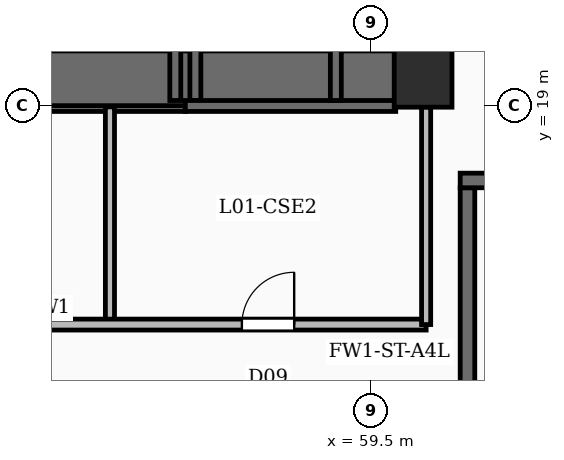
"""IFC4 building model, lengths in metres.
Left out: names, types, materials, properties, quantities, classifications, styles, units other than length and angle.
Written with IfcOpenShell. Run it as: python <this file> out.ifc"""

import sys

from ifc_helpers import new_model, si_unit, direction, frame, frame_2d, origin, origin_2d, place, context, subcontext, project, spatial, rectangle, extrude, element, fill, save


model = new_model("IFC4")
c1 = context("Model", 3, precision=1e-05, world=origin(), true_north=direction((0.0, 1.0)))
c2 = subcontext(c1, "Body", "Model", "MODEL_VIEW")
j1 = project(units=[si_unit("LENGTHUNIT", "METRE"), si_unit("PLANEANGLEUNIT", "RADIAN")], contexts=[c1])
p1 = place(None, origin())
s1 = spatial("IfcSite", under=j1, at=p1, CompositionType="ELEMENT")
p2 = place(p1, origin())
s2 = spatial("IfcBuilding", under=s1, at=p2, CompositionType="ELEMENT")
p3 = place(p2, frame((0.0, 0.0, 8.0)))
s3 = spatial("IfcBuildingStorey", under=s2, at=p3, CompositionType="ELEMENT", Elevation=8.0)
p4 = place(p3, frame((60.35, 19.0, -0.35), z_axis=(0.0, 0.0, 1.0), x_axis=(0.0, 1.0, 0.0)))
e1 = element("IfcWall", 1, at=p4, inside=s3, PredefinedType="SHEAR", context=c2, shape_type="SweptSolid", body=[
    extrude(rectangle(XDim=20.8, YDim=0.9, at=frame_2d((10.4, 0.0))), origin(), (0.0, 0.0, 1.0), 5.0),
])
p5 = place(p3, frame((51.0, 19.45, -0.35), z_axis=(0.0, 0.0, 1.0), x_axis=(1.0, 0.0, 0.0)))
e2 = element("IfcWall", 2, at=p5, inside=s3, PredefinedType="SHEAR", context=c2, shape_type="SweptSolid", body=[
    extrude(rectangle(XDim=8.9, YDim=0.9, at=frame_2d((4.45, 0.0))), origin(), (0.0, 0.0, 1.0), 5.0),
])
p6 = place(p3, frame((60.35, 19.45, -0.35), z_axis=(0.0, 0.0, 1.0), x_axis=(1.0, 0.0, 0.0)))
e3 = element("IfcColumn", 3, at=p6, inside=s3, PredefinedType="COLUMN", context=c2, shape_type="SweptSolid", body=[
    extrude(rectangle(XDim=0.95, YDim=0.95, at=origin_2d()), origin(), (0.0, 0.0, 1.0), 5.0),
])
p7 = place(p3, frame((60.96, 17.77, 0.0), z_axis=(0.0, 0.0, 1.0), x_axis=(1.0, 0.0, 0.0)))
e4 = element("IfcWall", 4, at=p7, inside=s3, PredefinedType="SOLIDWALL", context=c2, shape_type="SweptSolid", body=[
    extrude(rectangle(XDim=9.88, YDim=0.24, at=frame_2d((4.94, 0.0))), origin(), (0.0, 0.0, 1.0), 4.65),
])
p8 = place(p7, frame((0.69, 0.0, 0.0)))
e5 = element("IfcOpeningElement", 5, at=p8, cuts=e4, PredefinedType="OPENING", context=c2, shape_type="SweptSolid", body=[
    extrude(rectangle(XDim=1.1, YDim=2.15, at=frame_2d((0.55, 1.075))), frame((0.0, 0.13, 0.0), z_axis=(0.0, -1.0, 0.0), x_axis=(1.0, 0.0, 0.0)), (0.0, 0.0, 1.0), 0.26),
])
p9 = place(p3, frame((61.08, 13.5, 0.0), z_axis=(0.0, 0.0, 1.0), x_axis=(0.0, 1.0, 0.0)))
e6 = element("IfcWall", 6, at=p9, inside=s3, PredefinedType="SOLIDWALL", context=c2, shape_type="SweptSolid", body=[
    extrude(rectangle(XDim=4.15, YDim=0.24, at=frame_2d((2.075, 0.0))), origin(), (0.0, 0.0, 1.0), 4.65),
])
p10 = place(p3, frame((53.79, 18.995, 0.0), z_axis=(0.0, 0.0, 1.0), x_axis=(1.0, 0.0, 0.0)))
e7 = element("IfcWall", 7, at=p10, inside=s3, PredefinedType="SOLIDWALL", context=c2, shape_type="SweptSolid", body=[
    extrude(rectangle(XDim=2.65, YDim=0.18, at=frame_2d((1.325, 0.0))), origin(), (0.0, 0.0, 1.0), 4.65),
])
p11 = place(p3, frame((56.275, 19.085, 0.0), z_axis=(0.0, 0.0, 1.0), x_axis=(0.0, 1.0, 0.0)))
e8 = element("IfcWall", 8, at=p11, inside=s3, PredefinedType="SOLIDWALL", context=c2, shape_type="SweptSolid", body=[
    extrude(rectangle(XDim=1.73, YDim=0.18, at=frame_2d((0.865, 0.0))), origin(), (0.0, 0.0, 1.0), 4.65),
])
p12 = place(p3, frame((56.44, 18.995, 0.0), z_axis=(0.0, 0.0, 1.0), x_axis=(1.0, 0.0, 0.0)))
e9 = element("IfcWall", 9, at=p12, inside=s3, PredefinedType="SOLIDWALL", context=c2, shape_type="SweptSolid", body=[
    extrude(rectangle(XDim=3.46, YDim=0.18, at=frame_2d((1.73, 0.0))), origin(), (0.0, 0.0, 1.0), 4.65),
])
for number, where, z_axis, x_axis in (
    (10, (56.605, 19.085, 0.0), (0.0, 0.0, 1.0), (0.0, 1.0, 0.0)),
    (11, (58.915, 19.085, 0.0), (0.0, 0.0, 1.0), (0.0, 1.0, 0.0)),
):
    element("IfcWall", number, at=place(p3, frame(where, z_axis=z_axis, x_axis=x_axis)), inside=s3, PredefinedType="SOLIDWALL", context=c2, shape_type="SweptSolid", body=[
        extrude(rectangle(XDim=1.73, YDim=0.18, at=frame_2d((0.865, 0.0))), origin(), (0.0, 0.0, 1.0), 4.65),
    ])
p13 = place(p3, frame((55.2, 15.4, 0.0), z_axis=(0.0, 0.0, 1.0), x_axis=(0.0, 1.0, 0.0)))
e12 = element("IfcWall", 12, at=p13, inside=s3, PredefinedType="PARTITIONING", context=c2, shape_type="SweptSolid", body=[
    extrude(rectangle(XDim=3.58, YDim=0.15, at=frame_2d((1.79, 0.0))), origin(), (0.0, 0.0, 1.0), 3.71),
])
p14 = place(p3, frame((50.4, 15.4, 0.0), z_axis=(0.0, 0.0, 1.0), x_axis=(1.0, 0.0, 0.0)))
e13 = element("IfcWall", 13, at=p14, inside=s3, PredefinedType="SOLIDWALL", context=c2, shape_type="SweptSolid", body=[
    extrude(rectangle(XDim=10.0, YDim=0.18, at=frame_2d((5.0, 0.0))), origin(), (0.0, 0.0, 1.0), 3.71),
])
p15 = place(p14, frame((1.94, 0.0, 0.0)))
e14 = element("IfcOpeningElement", 14, at=p15, cuts=e13, PredefinedType="OPENING", context=c2, shape_type="SweptSolid", body=[
    extrude(rectangle(XDim=0.92, YDim=2.1, at=frame_2d((0.46, 1.05))), frame((0.0, 0.1, 0.0), z_axis=(0.0, -1.0, 0.0), x_axis=(1.0, 0.0, 0.0)), (0.0, 0.0, 1.0), 0.2),
])
p16 = place(p14, frame((6.97, 0.0, 0.0)))
e15 = element("IfcOpeningElement", 15, at=p16, cuts=e13, PredefinedType="OPENING", context=c2, shape_type="SweptSolid", body=[
    extrude(rectangle(XDim=0.86, YDim=2.05, at=frame_2d((0.43, 1.025))), frame((0.0, 0.1, 0.0), z_axis=(0.0, -1.0, 0.0), x_axis=(1.0, 0.0, 0.0)), (0.0, 0.0, 1.0), 0.2),
])
p17 = place(p3, frame((60.4, 15.4, 0.0), z_axis=(0.0, 0.0, 1.0), x_axis=(0.0, 1.0, 0.0)))
e16 = element("IfcWall", 16, at=p17, inside=s3, PredefinedType="PARTITIONING", context=c2, shape_type="SweptSolid", body=[
    extrude(rectangle(XDim=3.58, YDim=0.15, at=frame_2d((1.79, 0.0))), origin(), (0.0, 0.0, 1.0), 3.71),
])
p18 = place(p16, origin())
e17 = element("IfcDoor", 17, at=p18, inside=s3, OperationType="SINGLE_SWING_RIGHT", PredefinedType="DOOR", context=c2, shape_type="SweptSolid", body=[
    extrude(rectangle(XDim=0.86, YDim=2.05, at=frame_2d((0.43, 1.025))), frame((0.0, 0.025, 0.0), z_axis=(0.0, -1.0, 0.0), x_axis=(1.0, 0.0, 0.0)), (0.0, 0.0, 1.0), 0.05),
])
fill(e15, e17)
save(model, sys.argv[1])
